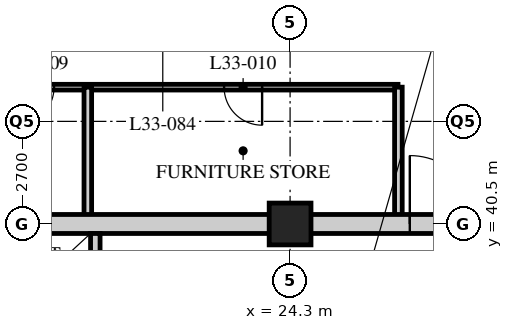
"""IFC4 building model, lengths in metres.
Left out: names, types, materials, properties, quantities, classifications, styles, units other than length and angle.
Written with IfcOpenShell. Run it as: python <this file> out.ifc"""

import sys

from ifc_helpers import new_model, si_unit, direction, frame, frame_2d, origin, origin_2d, place, context, subcontext, project, spatial, rectangle, hollow_rectangle, extrude, element, fill, save


model = new_model("IFC4")
c1 = context("Model", 3, precision=1e-05, world=origin(), true_north=direction((0.0, 1.0)))
c2 = subcontext(c1, "Body", "Model", "MODEL_VIEW")
j1 = project(units=[si_unit("LENGTHUNIT", "METRE"), si_unit("PLANEANGLEUNIT", "RADIAN")], contexts=[c1])
p1 = place(None, origin())
s1 = spatial("IfcSite", under=j1, at=p1, CompositionType="ELEMENT")
p2 = place(p1, origin())
s2 = spatial("IfcBuilding", under=s1, at=p2, CompositionType="ELEMENT")
p3 = place(p2, frame((0.0, 0.0, 130.6)))
s3 = spatial("IfcBuildingStorey", under=s2, at=p3, CompositionType="ELEMENT", Elevation=130.6)
p4 = place(p3, frame((24.3, 40.5, 0.0), z_axis=(0.0, 0.0, 1.0), x_axis=(1.0, 0.0, 0.0)))
e1 = element("IfcColumn", 1, at=p4, inside=s3, PredefinedType="COLUMN", context=c2, shape_type="SweptSolid", body=[
    extrude(hollow_rectangle(XDim=1.1, YDim=1.1, WallThickness=0.1, at=origin_2d()), origin(), (0.0, 0.0, 1.0), 3.4),
])
p5 = place(p3, frame((27.14, 44.1, 0.0), z_axis=(0.0, 0.0, 1.0), x_axis=(-1.0, 0.0, 0.0)))
e2 = element("IfcWall", 2, at=p5, inside=s3, PredefinedType="PARTITIONING", context=c2, shape_type="SweptSolid", body=[
    extrude(rectangle(XDim=17.24, YDim=0.15, at=frame_2d((8.62, 0.0))), origin(), (0.0, 0.0, 1.0), 3.19),
])
p6 = place(p5, frame((13.59, 0.0, 0.0)))
e3 = element("IfcOpeningElement", 3, at=p6, cuts=e2, PredefinedType="OPENING", context=c2, shape_type="SweptSolid", body=[
    extrude(rectangle(XDim=1.0, YDim=2.1, at=frame_2d((0.5, 1.05))), frame((0.0, 0.085, 0.0), z_axis=(0.0, -1.0, 0.0), x_axis=(1.0, 0.0, 0.0)), (0.0, 0.0, 1.0), 0.17),
])
p7 = place(p5, frame((9.051, 0.0, 0.0)))
e4 = element("IfcOpeningElement", 4, at=p7, cuts=e2, PredefinedType="OPENING", context=c2, shape_type="SweptSolid", body=[
    extrude(rectangle(XDim=1.0, YDim=2.1, at=frame_2d((0.5, 1.05))), frame((0.0, 0.085, 0.0), z_axis=(0.0, -1.0, 0.0), x_axis=(1.0, 0.0, 0.0)), (0.0, 0.0, 1.0), 0.17),
])
p8 = place(p5, frame((3.576, 0.0, 0.0)))
e5 = element("IfcOpeningElement", 5, at=p8, cuts=e2, PredefinedType="OPENING", context=c2, shape_type="SweptSolid", body=[
    extrude(rectangle(XDim=1.0, YDim=2.1, at=frame_2d((0.5, 1.05))), frame((0.0, 0.085, 0.0), z_axis=(0.0, -1.0, 0.0), x_axis=(1.0, 0.0, 0.0)), (0.0, 0.0, 1.0), 0.17),
])
for number, where, z_axis, x_axis in (
    (6, (18.978, 44.1, 0.0), (0.0, 0.0, 1.0), (0.0, -1.0, 0.0)),
    (7, (27.15, 40.5, 0.0), (0.0, 0.0, 1.0), (0.0, 1.0, 0.0)),
):
    element("IfcWall", number, at=place(p3, frame(where, z_axis=z_axis, x_axis=x_axis)), inside=s3, PredefinedType="SOLIDWALL", context=c2, shape_type="SweptSolid", body=[
        extrude(rectangle(XDim=3.6, YDim=0.2, at=frame_2d((1.8, 0.0))), origin(), (0.0, 0.0, 1.0), 3.19),
    ])
p9 = place(p3, frame((15.95, 40.5, 0.0), z_axis=(0.0, 0.0, 1.0), x_axis=(1.0, 0.0, 0.0)))
e8 = element("IfcWall", 8, at=p9, inside=s3, PredefinedType="SOLIDWALL", context=c2, shape_type="SweptSolid", body=[
    extrude(rectangle(XDim=24.8, YDim=0.5, at=frame_2d((12.4, 0.0))), origin(), (0.0, 0.0, 1.0), 2.54),
])
p10 = place(p9, frame((11.5, 0.0, 0.0)))
e9 = element("IfcOpeningElement", 9, at=p10, cuts=e8, PredefinedType="OPENING", context=c2, shape_type="SweptSolid", body=[
    extrude(rectangle(XDim=1.8, YDim=2.4, at=frame_2d((0.9, 1.2))), frame((0.0, 0.26, 0.0), z_axis=(0.0, -1.0, 0.0), x_axis=(1.0, 0.0, 0.0)), (0.0, 0.0, 1.0), 0.52),
])
p11 = place(p3, frame((19.175, 32.5, 0.0), z_axis=(0.0, 0.0, 1.0), x_axis=(0.0, 1.0, 0.0)))
e10 = element("IfcWall", 10, at=p11, inside=s3, PredefinedType="SOLIDWALL", context=c2, shape_type="SweptSolid", body=[
    extrude(rectangle(XDim=7.75, YDim=0.25, at=frame_2d((3.875, 0.0))), origin(), (0.0, 0.0, 1.0), 3.19),
])
p12 = place(p11, frame((0.8, 0.0, 0.0)))
e11 = element("IfcOpeningElement", 11, at=p12, cuts=e10, PredefinedType="OPENING", context=c2, shape_type="SweptSolid", body=[
    extrude(rectangle(XDim=1.1, YDim=2.4, at=frame_2d((0.55, 1.2))), frame((0.0, 0.135, 0.0), z_axis=(0.0, -1.0, 0.0), x_axis=(1.0, 0.0, 0.0)), (0.0, 0.0, 1.0), 0.27),
])
p13 = place(p11, frame((3.4, 0.0, 0.0)))
e12 = element("IfcOpeningElement", 12, at=p13, cuts=e10, PredefinedType="OPENING", context=c2, shape_type="SweptSolid", body=[
    extrude(rectangle(XDim=1.1, YDim=2.4, at=frame_2d((0.55, 1.2))), frame((0.0, 0.135, 0.0), z_axis=(0.0, -1.0, 0.0), x_axis=(1.0, 0.0, 0.0)), (0.0, 0.0, 1.0), 0.27),
])
p14 = place(p11, frame((6.0, 0.0, 0.0)))
e13 = element("IfcOpeningElement", 13, at=p14, cuts=e10, PredefinedType="OPENING", context=c2, shape_type="SweptSolid", body=[
    extrude(rectangle(XDim=1.1, YDim=2.4, at=frame_2d((0.55, 1.2))), frame((0.0, 0.135, 0.0), z_axis=(0.0, -1.0, 0.0), x_axis=(1.0, 0.0, 0.0)), (0.0, 0.0, 1.0), 0.27),
])
p15 = place(p7, origin())
e14 = element("IfcDoor", 14, at=p15, inside=s3, OperationType="SINGLE_SWING_RIGHT", PredefinedType="DOOR", context=c2, shape_type="SweptSolid", body=[
    extrude(rectangle(XDim=1.0, YDim=2.1, at=frame_2d((0.5, 1.05))), frame((0.0, 0.025, 0.0), z_axis=(0.0, -1.0, 0.0), x_axis=(1.0, 0.0, 0.0)), (0.0, 0.0, 1.0), 0.05),
])
fill(e4, e14)
p16 = place(p8, origin())
e15 = element("IfcDoor", 15, at=p16, inside=s3, OperationType="SINGLE_SWING_LEFT", PredefinedType="DOOR", context=c2, shape_type="SweptSolid", body=[
    extrude(rectangle(XDim=1.0, YDim=2.1, at=frame_2d((0.5, 1.05))), frame((0.0, 0.025, 0.0), z_axis=(0.0, -1.0, 0.0), x_axis=(1.0, 0.0, 0.0)), (0.0, 0.0, 1.0), 0.05),
])
fill(e5, e15)
p17 = place(p10, origin())
e16 = element("IfcDoor", 16, at=p17, inside=s3, OperationType="DOUBLE_DOOR_SINGLE_SWING", PredefinedType="DOOR", context=c2, shape_type="SweptSolid", body=[
    extrude(rectangle(XDim=1.8, YDim=2.4, at=frame_2d((0.9, 1.2))), frame((0.0, 0.025, 0.0), z_axis=(0.0, -1.0, 0.0), x_axis=(1.0, 0.0, 0.0)), (0.0, 0.0, 1.0), 0.05),
])
fill(e9, e16)
save(model, sys.argv[1])
